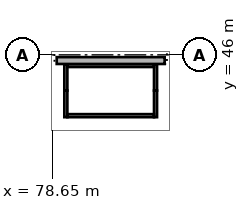
"""IFC4 building model, lengths in metres.
Left out: names, types, materials, properties, quantities, classifications, styles, units other than length and angle.
Written with IfcOpenShell. Run it as: python <this file> out.ifc"""

import sys

from ifc_helpers import new_model, si_unit, direction, frame, frame_2d, origin, origin_2d, place, context, subcontext, project, spatial, rectangle, extrude, element, fill, save


model = new_model("IFC4")
c1 = context("Model", 3, precision=1e-05, world=origin(), true_north=direction((0.0, 1.0)))
c2 = subcontext(c1, "Body", "Model", "MODEL_VIEW")
j1 = project(units=[si_unit("LENGTHUNIT", "METRE"), si_unit("PLANEANGLEUNIT", "RADIAN")], contexts=[c1])
p1 = place(None, origin())
s1 = spatial("IfcSite", under=j1, at=p1, CompositionType="ELEMENT")
p2 = place(p1, origin())
s2 = spatial("IfcBuilding", under=s1, at=p2, CompositionType="ELEMENT")
p3 = place(p2, origin())
s3 = spatial("IfcBuildingStorey", under=s2, at=p3, CompositionType="ELEMENT", Elevation=0.0)
for number, where, z_axis, x_axis in (
    (1, (78.0, 46.0, 0.0), (0.0, 0.0, 1.0), (1.0, 0.0, 0.0)),
    (2, (87.0, 46.0, 0.0), (0.0, 0.0, 1.0), (1.0, 0.0, 0.0)),
):
    element("IfcColumn", number, at=place(p3, frame(where, z_axis=z_axis, x_axis=x_axis)), inside=s3, PredefinedType="COLUMN", context=c2, shape_type="SweptSolid", body=[
        extrude(rectangle(XDim=1.6, YDim=1.2, at=origin_2d()), origin(), (0.0, 0.0, 1.0), 5.0),
    ])
for number, where, z_axis, x_axis in (
    (3, (79.55, 45.4, 0.0), (0.0, 0.0, 1.0), (0.0, -1.0, 0.0)),
    (4, (79.55, 43.65, 0.0), (0.0, 0.0, 1.0), (0.0, -1.0, 0.0)),
    (5, (85.45, 45.4, 0.0), (0.0, 0.0, 1.0), (0.0, -1.0, 0.0)),
    (6, (85.45, 43.65, 0.0), (0.0, 0.0, 1.0), (0.0, -1.0, 0.0)),
):
    element("IfcWall", number, at=place(p3, frame(where, z_axis=z_axis, x_axis=x_axis)), inside=s3, PredefinedType="SOLIDWALL", context=c2, shape_type="SweptSolid", body=[
        extrude(rectangle(XDim=1.75, YDim=0.2, at=frame_2d((0.875, 0.0))), origin(), (0.0, 0.0, 1.0), 3.2),
    ])
p4 = place(p3, frame((79.65, 42.0, 0.0), z_axis=(0.0, 0.0, 1.0), x_axis=(1.0, 0.0, 0.0)))
e7 = element("IfcWall", 7, at=p4, inside=s3, PredefinedType="SOLIDWALL", context=c2, shape_type="SweptSolid", body=[
    extrude(rectangle(XDim=5.7, YDim=0.2, at=frame_2d((2.85, 0.0))), origin(), (0.0, 0.0, 1.0), 3.2),
])
p5 = place(p4, frame((0.2, 0.0, 0.0)))
e8 = element("IfcOpeningElement", 8, at=p5, cuts=e7, PredefinedType="OPENING", context=c2, shape_type="SweptSolid", body=[
    extrude(rectangle(XDim=1.1, YDim=2.1, at=frame_2d((0.55, 1.05))), frame((0.0, 0.11, 0.0), z_axis=(0.0, -1.0, 0.0), x_axis=(1.0, 0.0, 0.0)), (0.0, 0.0, 1.0), 0.22),
])
p6 = place(p3, frame((79.65, 45.3, 0.0), z_axis=(0.0, 0.0, 1.0), x_axis=(1.0, 0.0, 0.0)))
e9 = element("IfcWall", 9, at=p6, inside=s3, PredefinedType="SOLIDWALL", context=c2, shape_type="SweptSolid", body=[
    extrude(rectangle(XDim=5.7, YDim=0.2, at=frame_2d((2.85, 0.0))), origin(), (0.0, 0.0, 1.0), 3.2),
])
p7 = place(p3, frame((78.95, 45.625, 0.0), z_axis=(0.0, 0.0, 1.0), x_axis=(1.0, 0.0, 0.0)))
e10 = element("IfcWall", 10, at=p7, inside=s3, PredefinedType="SOLIDWALL", context=c2, shape_type="SweptSolid", body=[
    extrude(rectangle(XDim=7.1, YDim=0.45, at=frame_2d((3.55, 0.0))), origin(), (0.0, 0.0, 1.0), 5.0),
])
p8 = place(p5, frame((1.1, 0.0, 0.0), z_axis=(0.0, 0.0, 1.0), x_axis=(-1.0, 0.0, 0.0)))
e11 = element("IfcDoor", 11, at=p8, inside=s3, OperationType="SINGLE_SWING_LEFT", PredefinedType="DOOR", context=c2, shape_type="SweptSolid", body=[
    extrude(rectangle(XDim=1.1, YDim=2.1, at=frame_2d((0.55, 1.05))), frame((0.0, 0.025, 0.0), z_axis=(0.0, -1.0, 0.0), x_axis=(1.0, 0.0, 0.0)), (0.0, 0.0, 1.0), 0.05),
])
fill(e8, e11)
save(model, sys.argv[1])
